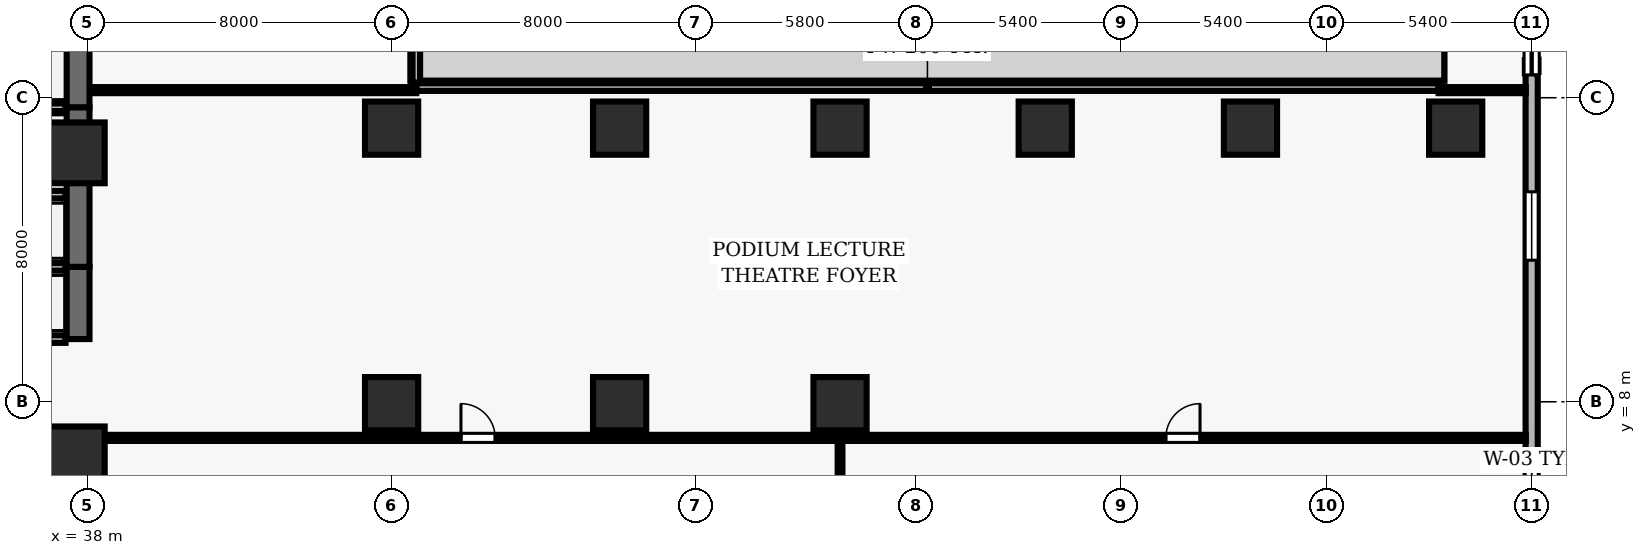
"""IFC4 building model, lengths in metres.
Left out: names, types, materials, properties, quantities, classifications, styles, units other than length and angle.
Written with IfcOpenShell. Run it as: python <this file> out.ifc"""

import sys

from ifc_helpers import new_model, si_unit, direction, frame, frame_2d, origin, origin_2d, place, context, subcontext, project, spatial, rectangle, extrude, element, fill, save


model = new_model("IFC4")
c1 = context("Model", 3, precision=1e-05, world=origin(), true_north=direction((0.0, 1.0)))
c2 = subcontext(c1, "Body", "Model", "MODEL_VIEW")
j1 = project(units=[si_unit("LENGTHUNIT", "METRE"), si_unit("PLANEANGLEUNIT", "RADIAN")], contexts=[c1])
p1 = place(None, origin())
s1 = spatial("IfcSite", under=j1, at=p1, CompositionType="ELEMENT")
p2 = place(p1, origin())
s2 = spatial("IfcBuilding", under=s1, at=p2, CompositionType="ELEMENT")
p3 = place(p2, origin())
s3 = spatial("IfcBuildingStorey", under=s2, at=p3, CompositionType="ELEMENT", Elevation=0.0)
for number, where, z_axis, x_axis in (
    (1, (37.65, 6.55, 0.0), (0.0, 0.0, 1.0), (1.0, 0.0, 0.0)),
    (2, (37.65, 14.55, 0.0), (0.0, 0.0, 1.0), (1.0, 0.0, 0.0)),
):
    element("IfcColumn", number, at=place(p3, frame(where, z_axis=z_axis, x_axis=x_axis)), inside=s3, PredefinedType="COLUMN", context=c2, shape_type="SweptSolid", body=[
        extrude(rectangle(XDim=1.6, YDim=1.6, at=origin_2d()), origin(), (0.0, 0.0, 1.0), 5.2),
    ])
for number, where, z_axis, x_axis in (
    (3, (46.0, 7.95, 0.0), (0.0, 0.0, 1.0), (1.0, 0.0, 0.0)),
    (4, (46.0, 15.2, 0.0), (0.0, 0.0, 1.0), (1.0, 0.0, 0.0)),
    (5, (52.0, 7.95, 0.0), (0.0, 0.0, 1.0), (1.0, 0.0, 0.0)),
    (6, (52.0, 15.2, 0.0), (0.0, 0.0, 1.0), (1.0, 0.0, 0.0)),
    (7, (57.8, 7.95, 0.0), (0.0, 0.0, 1.0), (1.0, 0.0, 0.0)),
    (8, (57.8, 15.2, 0.0), (0.0, 0.0, 1.0), (1.0, 0.0, 0.0)),
    (9, (63.2, 15.2, 0.0), (0.0, 0.0, 1.0), (1.0, 0.0, 0.0)),
    (10, (68.6, 15.2, 0.0), (0.0, 0.0, 1.0), (1.0, 0.0, 0.0)),
    (11, (74.0, 15.2, 0.0), (0.0, 0.0, 1.0), (1.0, 0.0, 0.0)),
):
    element("IfcColumn", number, at=place(p3, frame(where, z_axis=z_axis, x_axis=x_axis)), inside=s3, PredefinedType="COLUMN", context=c2, shape_type="SweptSolid", body=[
        extrude(rectangle(XDim=1.4, YDim=1.4, at=origin_2d()), origin(), (0.0, 0.0, 1.0), 5.2),
    ])
p4 = place(p3, frame((76.0, 2.5, 0.0), z_axis=(0.0, 0.0, 1.0), x_axis=(0.0, 1.0, 0.0)))
e12 = element("IfcWall", 12, at=p4, inside=s3, PredefinedType="SOLIDWALL", context=c2, shape_type="SweptSolid", body=[
    extrude(rectangle(XDim=27.0, YDim=0.32, at=frame_2d((13.5, 0.0))), origin(), (0.0, 0.0, 1.0), 4.92),
])
p5 = place(p4, frame((14.1, 0.0, 0.0)))
e13 = element("IfcOpeningElement", 13, at=p5, cuts=e12, PredefinedType="OPENING", context=c2, shape_type="SweptSolid", body=[
    extrude(rectangle(XDim=4.0, YDim=2.8, at=frame_2d((2.0, 1.4))), frame((0.0, 0.17, 0.0), z_axis=(0.0, -1.0, 0.0), x_axis=(1.0, 0.0, 0.0)), (0.0, 0.0, 1.0), 0.34),
])
p6 = place(p4, frame((2.025, 0.0, 0.9)))
e14 = element("IfcOpeningElement", 14, at=p6, cuts=e12, PredefinedType="OPENING", context=c2, shape_type="SweptSolid", body=[
    extrude(rectangle(XDim=1.8, YDim=1.6, at=frame_2d((0.9, 0.8))), frame((0.0, 0.17, 0.0), z_axis=(0.0, -1.0, 0.0), x_axis=(1.0, 0.0, 0.0)), (0.0, 0.0, 1.0), 0.34),
])
p7 = place(p4, frame((9.225, 0.0, 0.9)))
e15 = element("IfcOpeningElement", 15, at=p7, cuts=e12, PredefinedType="OPENING", context=c2, shape_type="SweptSolid", body=[
    extrude(rectangle(XDim=1.8, YDim=1.6, at=frame_2d((0.9, 0.8))), frame((0.0, 0.17, 0.0), z_axis=(0.0, -1.0, 0.0), x_axis=(1.0, 0.0, 0.0)), (0.0, 0.0, 1.0), 0.34),
])
p8 = place(p4, frame((22.725, 0.0, 0.9)))
e16 = element("IfcOpeningElement", 16, at=p8, cuts=e12, PredefinedType="OPENING", context=c2, shape_type="SweptSolid", body=[
    extrude(rectangle(XDim=1.8, YDim=1.6, at=frame_2d((0.9, 0.8))), frame((0.0, 0.17, 0.0), z_axis=(0.0, -1.0, 0.0), x_axis=(1.0, 0.0, 0.0)), (0.0, 0.0, 1.0), 0.34),
])
p9 = place(p3, frame((37.75, 4.7, 0.0), z_axis=(0.0, 0.0, 1.0), x_axis=(0.0, 1.0, 0.0)))
e17 = element("IfcWall", 17, at=p9, inside=s3, PredefinedType="SHEAR", context=c2, shape_type="SweptSolid", body=[
    extrude(rectangle(XDim=2.25, YDim=0.6, at=frame_2d((1.125, 0.0))), origin(), (0.0, 0.0, 1.0), 4.92),
])
p10 = place(p3, frame((37.42, 6.95, 0.0), z_axis=(0.0, 0.0, 1.0), x_axis=(-1.0, 0.0, 0.0)))
e18 = element("IfcWall", 18, at=p10, inside=s3, PredefinedType="SOLIDWALL", context=c2, shape_type="SweptSolid", body=[
    extrude(rectangle(XDim=2.14, YDim=0.2, at=frame_2d((1.07, 0.0))), origin(), (0.0, 0.0, 1.0), 4.92),
])
p11 = place(p3, frame((37.75, 9.65, 0.0), z_axis=(0.0, 0.0, 1.0), x_axis=(0.0, 1.0, 0.0)))
e19 = element("IfcWall", 19, at=p11, inside=s3, PredefinedType="SHEAR", context=c2, shape_type="SweptSolid", body=[
    extrude(rectangle(XDim=1.9, YDim=0.6, at=frame_2d((0.95, 0.0))), origin(), (0.0, 0.0, 1.0), 4.92),
])
for number, where, z_axis, x_axis in (
    (20, (35.28, 9.65, 0.0), (0.0, 0.0, 1.0), (1.0, 0.0, 0.0)),
    (21, (37.42, 11.55, 0.0), (0.0, 0.0, 1.0), (-1.0, 0.0, 0.0)),
):
    element("IfcWall", number, at=place(p3, frame(where, z_axis=z_axis, x_axis=x_axis)), inside=s3, PredefinedType="SOLIDWALL", context=c2, shape_type="SweptSolid", body=[
        extrude(rectangle(XDim=2.14, YDim=0.2, at=frame_2d((1.07, 0.0))), origin(), (0.0, 0.0, 1.0), 4.92),
    ])
p12 = place(p3, frame((37.75, 11.55, 0.0), z_axis=(0.0, 0.0, 1.0), x_axis=(0.0, 1.0, 0.0)))
e22 = element("IfcWall", 22, at=p12, inside=s3, PredefinedType="SHEAR", context=c2, shape_type="SweptSolid", body=[
    extrude(rectangle(XDim=2.35, YDim=0.6, at=frame_2d((1.175, 0.0))), origin(), (0.0, 0.0, 1.0), 4.92),
])
p13 = place(p3, frame((37.42, 13.45, 0.0), z_axis=(0.0, 0.0, 1.0), x_axis=(-1.0, 0.0, 0.0)))
e23 = element("IfcWall", 23, at=p13, inside=s3, PredefinedType="SOLIDWALL", context=c2, shape_type="SweptSolid", body=[
    extrude(rectangle(XDim=2.14, YDim=0.2, at=frame_2d((1.07, 0.0))), origin(), (0.0, 0.0, 1.0), 4.92),
])
p14 = place(p3, frame((37.75, 13.9, 0.0), z_axis=(0.0, 0.0, 1.0), x_axis=(0.0, 1.0, 0.0)))
e24 = element("IfcWall", 24, at=p14, inside=s3, PredefinedType="SHEAR", context=c2, shape_type="SweptSolid", body=[
    extrude(rectangle(XDim=1.85, YDim=0.6, at=frame_2d((0.925, 0.0))), origin(), (0.0, 0.0, 1.0), 4.92),
])
for number, where, z_axis, x_axis in (
    (25, (35.28, 13.9, 0.0), (0.0, 0.0, 1.0), (1.0, 0.0, 0.0)),
    (26, (37.42, 15.75, 0.0), (0.0, 0.0, 1.0), (-1.0, 0.0, 0.0)),
):
    element("IfcWall", number, at=place(p3, frame(where, z_axis=z_axis, x_axis=x_axis)), inside=s3, PredefinedType="SOLIDWALL", context=c2, shape_type="SweptSolid", body=[
        extrude(rectangle(XDim=2.14, YDim=0.2, at=frame_2d((1.07, 0.0))), origin(), (0.0, 0.0, 1.0), 4.92),
    ])
p15 = place(p3, frame((37.75, 15.75, 0.0), z_axis=(0.0, 0.0, 1.0), x_axis=(0.0, 1.0, 0.0)))
e27 = element("IfcWall", 27, at=p15, inside=s3, PredefinedType="SHEAR", context=c2, shape_type="SweptSolid", body=[
    extrude(rectangle(XDim=1.85, YDim=0.6, at=frame_2d((0.925, 0.0))), origin(), (0.0, 0.0, 1.0), 4.92),
])
p16 = place(p3, frame((46.65, 16.28, 0.0), z_axis=(0.0, 0.0, 1.0), x_axis=(1.0, 0.0, 0.0)))
e28 = element("IfcWall", 28, at=p16, inside=s3, PredefinedType="SOLIDWALL", context=c2, shape_type="SweptSolid", body=[
    extrude(rectangle(XDim=26.9, YDim=0.2, at=frame_2d((13.45, 0.0))), origin(), (0.0, 0.0, 1.0), 4.92),
])
p17 = place(p3, frame((46.65, 16.4, 0.0), z_axis=(0.0, 0.0, 1.0), x_axis=(0.0, 1.0, 0.0)))
e29 = element("IfcWall", 29, at=p17, inside=s3, PredefinedType="SOLIDWALL", context=c2, shape_type="SweptSolid", body=[
    extrude(rectangle(XDim=4.4, YDim=0.2, at=frame_2d((2.2, 0.0))), origin(), (0.0, 0.0, 1.0), 4.92),
])
p18 = place(p3, frame((38.05, 7.05, 0.0), z_axis=(0.0, 0.0, 1.0), x_axis=(1.0, 0.0, 0.0)))
e30 = element("IfcWall", 30, at=p18, inside=s3, PredefinedType="PARTITIONING", context=c2, shape_type="SweptSolid", body=[
    extrude(rectangle(XDim=19.75, YDim=0.16, at=frame_2d((9.875, 0.0))), origin(), (0.0, 0.0, 1.0), 4.92),
])
p19 = place(p18, frame((9.775, 0.0, 0.0)))
e31 = element("IfcOpeningElement", 31, at=p19, cuts=e30, PredefinedType="OPENING", context=c2, shape_type="SweptSolid", body=[
    extrude(rectangle(XDim=0.9, YDim=2.1, at=frame_2d((0.45, 1.05))), frame((0.0, 0.09, 0.0), z_axis=(0.0, -1.0, 0.0), x_axis=(1.0, 0.0, 0.0)), (0.0, 0.0, 1.0), 0.18),
])
p20 = place(p3, frame((46.65, 16.2, 0.0), z_axis=(0.0, 0.0, 1.0), x_axis=(-1.0, 0.0, 0.0)))
e32 = element("IfcWall", 32, at=p20, inside=s3, PredefinedType="PARTITIONING", context=c2, shape_type="SweptSolid", body=[
    extrude(rectangle(XDim=8.57, YDim=0.16, at=frame_2d((4.285, 0.0))), origin(), (0.0, 0.0, 1.0), 4.92),
])
p21 = place(p3, frame((57.8, 7.05, 0.0), z_axis=(0.0, 0.0, 1.0), x_axis=(1.0, 0.0, 0.0)))
e33 = element("IfcWall", 33, at=p21, inside=s3, PredefinedType="PARTITIONING", context=c2, shape_type="SweptSolid", body=[
    extrude(rectangle(XDim=18.045, YDim=0.16, at=frame_2d((9.022, 0.0))), origin(), (0.0, 0.0, 1.0), 4.92),
])
p22 = place(p21, frame((8.573, 0.0, 0.0)))
e34 = element("IfcOpeningElement", 34, at=p22, cuts=e33, PredefinedType="OPENING", context=c2, shape_type="SweptSolid", body=[
    extrude(rectangle(XDim=0.9, YDim=2.1, at=frame_2d((0.45, 1.05))), frame((0.0, 0.09, 0.0), z_axis=(0.0, -1.0, 0.0), x_axis=(1.0, 0.0, 0.0)), (0.0, 0.0, 1.0), 0.18),
])
p23 = place(p3, frame((75.845, 16.2, 0.0), z_axis=(0.0, 0.0, 1.0), x_axis=(-1.0, 0.0, 0.0)))
e35 = element("IfcWall", 35, at=p23, inside=s3, PredefinedType="PARTITIONING", context=c2, shape_type="SweptSolid", body=[
    extrude(rectangle(XDim=2.295, YDim=0.16, at=frame_2d((1.147, 0.0))), origin(), (0.0, 0.0, 1.0), 4.92),
])
p24 = place(p3, frame((57.8, 0.155, 0.0), z_axis=(0.0, 0.0, 1.0), x_axis=(0.0, 1.0, 0.0)))
e36 = element("IfcWall", 36, at=p24, inside=s3, PredefinedType="PARTITIONING", context=c2, shape_type="SweptSolid", body=[
    extrude(rectangle(XDim=6.82, YDim=0.125, at=frame_2d((3.41, 0.0))), origin(), (0.0, 0.0, 1.0), 4.065),
])
p25 = place(p5, origin())
e37 = element("IfcDoor", 37, at=p25, inside=s3, OperationType="ROLLINGUP", PredefinedType="GATE", context=c2, shape_type="SweptSolid", body=[
    extrude(rectangle(XDim=4.0, YDim=2.8, at=frame_2d((2.0, 1.4))), frame((0.0, 0.025, 0.0), z_axis=(0.0, -1.0, 0.0), x_axis=(1.0, 0.0, 0.0)), (0.0, 0.0, 1.0), 0.05),
])
fill(e13, e37)
p26 = place(p6, origin())
e38 = element("IfcWindow", 38, at=p26, inside=s3, PartitioningType="SINGLE_PANEL", PredefinedType="WINDOW", context=c2, shape_type="SweptSolid", body=[
    extrude(rectangle(XDim=1.8, YDim=1.6, at=frame_2d((0.9, 0.8))), frame((0.0, 0.03, 0.0), z_axis=(0.0, -1.0, 0.0), x_axis=(1.0, 0.0, 0.0)), (0.0, 0.0, 1.0), 0.06),
])
fill(e14, e38)
p27 = place(p7, origin())
e39 = element("IfcWindow", 39, at=p27, inside=s3, PartitioningType="SINGLE_PANEL", PredefinedType="WINDOW", context=c2, shape_type="SweptSolid", body=[
    extrude(rectangle(XDim=1.8, YDim=1.6, at=frame_2d((0.9, 0.8))), frame((0.0, 0.03, 0.0), z_axis=(0.0, -1.0, 0.0), x_axis=(1.0, 0.0, 0.0)), (0.0, 0.0, 1.0), 0.06),
])
fill(e15, e39)
p28 = place(p19, origin())
e40 = element("IfcDoor", 40, at=p28, inside=s3, OperationType="SINGLE_SWING_LEFT", PredefinedType="DOOR", context=c2, shape_type="SweptSolid", body=[
    extrude(rectangle(XDim=0.9, YDim=2.1, at=frame_2d((0.45, 1.05))), frame((0.0, 0.025, 0.0), z_axis=(0.0, -1.0, 0.0), x_axis=(1.0, 0.0, 0.0)), (0.0, 0.0, 1.0), 0.05),
])
fill(e31, e40)
p29 = place(p22, origin())
e41 = element("IfcDoor", 41, at=p29, inside=s3, OperationType="SINGLE_SWING_RIGHT", PredefinedType="DOOR", context=c2, shape_type="SweptSolid", body=[
    extrude(rectangle(XDim=0.9, YDim=2.1, at=frame_2d((0.45, 1.05))), frame((0.0, 0.025, 0.0), z_axis=(0.0, -1.0, 0.0), x_axis=(1.0, 0.0, 0.0)), (0.0, 0.0, 1.0), 0.05),
])
fill(e34, e41)
save(model, sys.argv[1])
